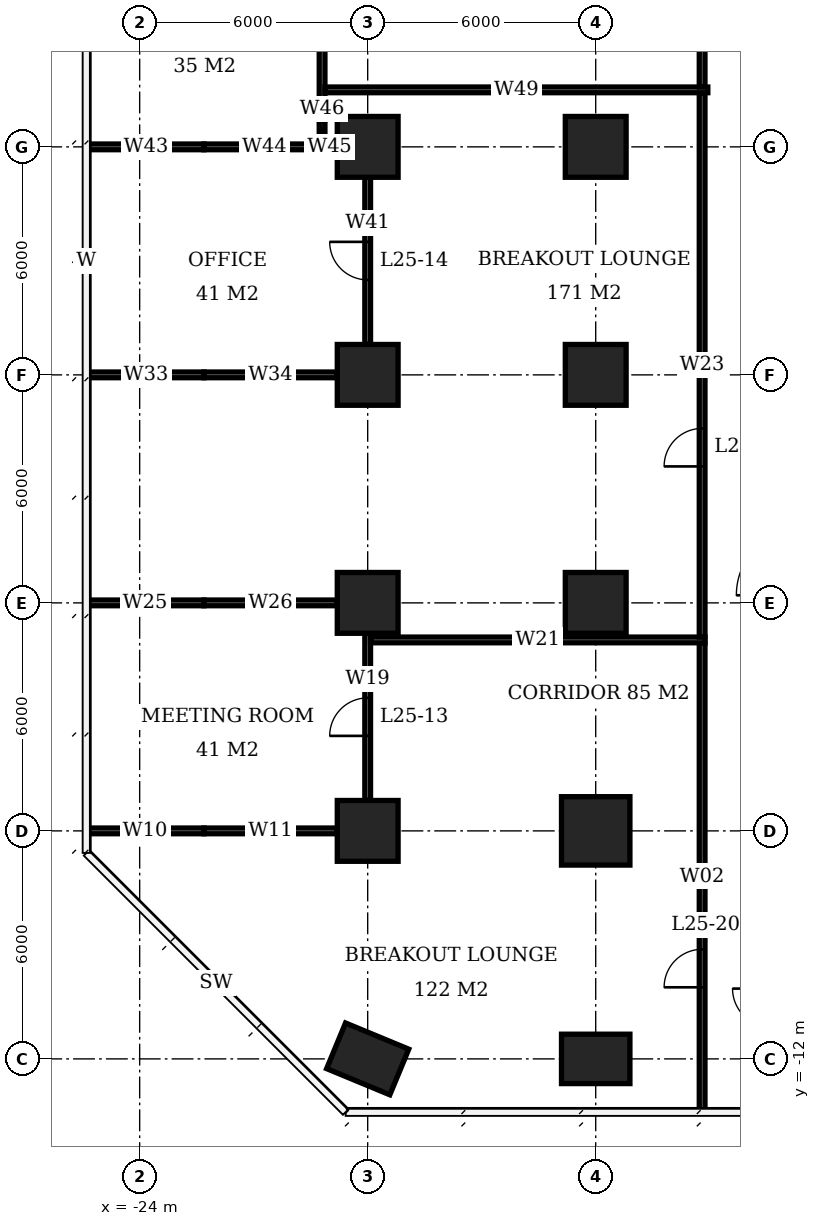
"""IFC4 building model, lengths in metres.
Left out: names, types, materials, properties, quantities, classifications, styles, units other than length and angle.
Written with IfcOpenShell. Run it as: python <this file> out.ifc"""

import sys

from ifc_helpers import new_model, si_unit, direction, frame, frame_2d, origin, origin_2d, place, context, subcontext, project, spatial, rectangle, extrude, element, fill, save


model = new_model("IFC4")
c1 = context("Model", 3, precision=1e-05, world=origin(), true_north=direction((0.0, 1.0)))
c2 = subcontext(c1, "Body", "Model", "MODEL_VIEW")
j1 = project(units=[si_unit("LENGTHUNIT", "METRE"), si_unit("PLANEANGLEUNIT", "RADIAN")], contexts=[c1])
p1 = place(None, origin())
s1 = spatial("IfcSite", under=j1, at=p1, CompositionType="ELEMENT")
p2 = place(p1, origin())
s2 = spatial("IfcBuilding", under=s1, at=p2, CompositionType="ELEMENT")
p3 = place(p2, frame((0.0, 0.0, 105.5)))
s3 = spatial("IfcBuildingStorey", under=s2, at=p3, CompositionType="ELEMENT", Elevation=105.5)
p4 = place(p3, frame((-18.0, -12.0, 0.0), z_axis=(0.0, 0.0, 1.0), x_axis=(-0.923879532511, 0.382683432365, 0.0)))
e1 = element("IfcColumn", 1, at=p4, inside=s3, PredefinedType="COLUMN", context=c2, shape_type="SweptSolid", body=[
    extrude(rectangle(XDim=1.8, YDim=1.3, at=origin_2d()), origin(), (0.0, 0.0, 1.0), 3.9),
])
for number, where, z_axis, x_axis in (
    (2, (-18.0, -6.0, 0.0), (0.0, 0.0, 1.0), (1.0, 0.0, 0.0)),
    (3, (-18.0, 0.0, 0.0), (0.0, 0.0, 1.0), (1.0, 0.0, 0.0)),
    (4, (-18.0, 6.0, 0.0), (0.0, 0.0, 1.0), (1.0, 0.0, 0.0)),
    (5, (-18.0, 12.0, 0.0), (0.0, 0.0, 1.0), (1.0, 0.0, 0.0)),
):
    element("IfcColumn", number, at=place(p3, frame(where, z_axis=z_axis, x_axis=x_axis)), inside=s3, PredefinedType="COLUMN", context=c2, shape_type="SweptSolid", body=[
        extrude(rectangle(XDim=1.6, YDim=1.6, at=origin_2d()), origin(), (0.0, 0.0, 1.0), 3.9),
    ])
p5 = place(p3, frame((-12.0, -12.0, 0.0), z_axis=(0.0, 0.0, 1.0), x_axis=(1.0, 0.0, 0.0)))
e6 = element("IfcColumn", 6, at=p5, inside=s3, PredefinedType="COLUMN", context=c2, shape_type="SweptSolid", body=[
    extrude(rectangle(XDim=1.8, YDim=1.3, at=origin_2d()), origin(), (0.0, 0.0, 1.0), 3.9),
])
p6 = place(p3, frame((-12.0, -6.0, 0.0), z_axis=(0.0, 0.0, 1.0), x_axis=(1.0, 0.0, 0.0)))
e7 = element("IfcColumn", 7, at=p6, inside=s3, PredefinedType="COLUMN", context=c2, shape_type="SweptSolid", body=[
    extrude(rectangle(XDim=1.8, YDim=1.8, at=origin_2d()), origin(), (0.0, 0.0, 1.0), 3.9),
])
for number, where, z_axis, x_axis in (
    (8, (-12.0, 0.0, 0.0), (0.0, 0.0, 1.0), (1.0, 0.0, 0.0)),
    (9, (-12.0, 6.0, 0.0), (0.0, 0.0, 1.0), (1.0, 0.0, 0.0)),
    (10, (-12.0, 12.0, 0.0), (0.0, 0.0, 1.0), (1.0, 0.0, 0.0)),
):
    element("IfcColumn", number, at=place(p3, frame(where, z_axis=z_axis, x_axis=x_axis)), inside=s3, PredefinedType="COLUMN", context=c2, shape_type="SweptSolid", body=[
        extrude(rectangle(XDim=1.6, YDim=1.6, at=origin_2d()), origin(), (0.0, 0.0, 1.0), 3.9),
    ])
p7 = place(p3, frame((-25.4, -6.0, 0.0), z_axis=(0.0, 0.0, 1.0), x_axis=(1.0, 0.0, 0.0)))
e11 = element("IfcWall", 11, at=p7, inside=s3, PredefinedType="PARTITIONING", context=c2, shape_type="SweptSolid", body=[
    extrude(rectangle(XDim=3.09, YDim=0.15, at=frame_2d((1.545, 0.0))), origin(), (0.0, 0.0, 1.0), 3.65),
])
p8 = place(p3, frame((-22.31, -6.0, 0.0), z_axis=(0.0, 0.0, 1.0), x_axis=(1.0, 0.0, 0.0)))
e12 = element("IfcWall", 12, at=p8, inside=s3, PredefinedType="PARTITIONING", context=c2, shape_type="SweptSolid", body=[
    extrude(rectangle(XDim=3.51, YDim=0.15, at=frame_2d((1.755, 0.0))), origin(), (0.0, 0.0, 1.0), 2.65),
])
p9 = place(p3, frame((-25.4, 0.0, 0.0), z_axis=(0.0, 0.0, 1.0), x_axis=(1.0, 0.0, 0.0)))
e13 = element("IfcWall", 13, at=p9, inside=s3, PredefinedType="PARTITIONING", context=c2, shape_type="SweptSolid", body=[
    extrude(rectangle(XDim=3.09, YDim=0.15, at=frame_2d((1.545, 0.0))), origin(), (0.0, 0.0, 1.0), 3.65),
])
p10 = place(p3, frame((-22.31, 0.0, 0.0), z_axis=(0.0, 0.0, 1.0), x_axis=(1.0, 0.0, 0.0)))
e14 = element("IfcWall", 14, at=p10, inside=s3, PredefinedType="PARTITIONING", context=c2, shape_type="SweptSolid", body=[
    extrude(rectangle(XDim=3.51, YDim=0.15, at=frame_2d((1.755, 0.0))), origin(), (0.0, 0.0, 1.0), 2.65),
])
p11 = place(p3, frame((-25.35, 6.0, 0.0), z_axis=(0.0, 0.0, 1.0), x_axis=(1.0, 0.0, 0.0)))
e15 = element("IfcWall", 15, at=p11, inside=s3, PredefinedType="PARTITIONING", context=c2, shape_type="SweptSolid", body=[
    extrude(rectangle(XDim=3.04, YDim=0.15, at=frame_2d((1.52, 0.0))), origin(), (0.0, 0.0, 1.0), 3.65),
])
p12 = place(p3, frame((-22.31, 6.0, 0.0), z_axis=(0.0, 0.0, 1.0), x_axis=(1.0, 0.0, 0.0)))
e16 = element("IfcWall", 16, at=p12, inside=s3, PredefinedType="PARTITIONING", context=c2, shape_type="SweptSolid", body=[
    extrude(rectangle(XDim=3.51, YDim=0.15, at=frame_2d((1.755, 0.0))), origin(), (0.0, 0.0, 1.0), 2.65),
])
p13 = place(p3, frame((-25.35, 12.0, 0.0), z_axis=(0.0, 0.0, 1.0), x_axis=(1.0, 0.0, 0.0)))
e17 = element("IfcWall", 17, at=p13, inside=s3, PredefinedType="PARTITIONING", context=c2, shape_type="SweptSolid", body=[
    extrude(rectangle(XDim=3.04, YDim=0.15, at=frame_2d((1.52, 0.0))), origin(), (0.0, 0.0, 1.0), 3.65),
])
p14 = place(p3, frame((-22.31, 12.0, 0.0), z_axis=(0.0, 0.0, 1.0), x_axis=(1.0, 0.0, 0.0)))
e18 = element("IfcWall", 18, at=p14, inside=s3, PredefinedType="PARTITIONING", context=c2, shape_type="SweptSolid", body=[
    extrude(rectangle(XDim=3.185, YDim=0.15, at=frame_2d((1.593, 0.0))), origin(), (0.0, 0.0, 1.0), 2.65),
])
p15 = place(p3, frame((-19.2, 12.0, 0.0), z_axis=(0.0, 0.0, 1.0), x_axis=(1.0, 0.0, 0.0)))
e19 = element("IfcWall", 19, at=p15, inside=s3, PredefinedType="PARTITIONING", context=c2, shape_type="SweptSolid", body=[
    extrude(rectangle(XDim=0.4, YDim=0.15, at=frame_2d((0.2, 0.0))), origin(), (0.0, 0.0, 1.0), 2.65),
])
p16 = place(p3, frame((-19.2, 12.075, 0.0), z_axis=(0.0, 0.0, 1.0), x_axis=(0.0, 1.0, 0.0)))
e20 = element("IfcWall", 20, at=p16, inside=s3, PredefinedType="PARTITIONING", context=c2, shape_type="SweptSolid", body=[
    extrude(rectangle(XDim=0.635, YDim=0.15, at=frame_2d((0.317, 0.0))), origin(), (0.0, 0.0, 1.0), 2.65),
])
p17 = place(p3, frame((-19.2, 12.71, 0.0), z_axis=(0.0, 0.0, 1.0), x_axis=(0.0, 1.0, 0.0)))
e21 = element("IfcWall", 21, at=p17, inside=s3, PredefinedType="PARTITIONING", context=c2, shape_type="SweptSolid", body=[
    extrude(rectangle(XDim=4.698, YDim=0.15, at=frame_2d((2.349, 0.0))), origin(), (0.0, 0.0, 1.0), 3.65),
])
p18 = place(p17, frame((1.849, 0.0, 0.0)))
e22 = element("IfcOpeningElement", 22, at=p18, cuts=e21, PredefinedType="OPENING", context=c2, shape_type="SweptSolid", body=[
    extrude(rectangle(XDim=1.0, YDim=2.1, at=frame_2d((0.5, 1.05))), frame((0.0, 0.085, 0.0), z_axis=(0.0, -1.0, 0.0), x_axis=(1.0, 0.0, 0.0)), (0.0, 0.0, 1.0), 0.17),
])
p19 = place(p3, frame((-18.0, -5.2, 0.0), z_axis=(0.0, 0.0, 1.0), x_axis=(0.0, 1.0, 0.0)))
e23 = element("IfcWall", 23, at=p19, inside=s3, PredefinedType="PARTITIONING", context=c2, shape_type="SweptSolid", body=[
    extrude(rectangle(XDim=4.4, YDim=0.15, at=frame_2d((2.2, 0.0))), origin(), (0.0, 0.0, 1.0), 3.65),
])
p20 = place(p19, frame((1.7, 0.0, 0.0)))
e24 = element("IfcOpeningElement", 24, at=p20, cuts=e23, PredefinedType="OPENING", context=c2, shape_type="SweptSolid", body=[
    extrude(rectangle(XDim=1.0, YDim=2.1, at=frame_2d((0.5, 1.05))), frame((0.0, 0.085, 0.0), z_axis=(0.0, -1.0, 0.0), x_axis=(1.0, 0.0, 0.0)), (0.0, 0.0, 1.0), 0.17),
])
p21 = place(p3, frame((-18.0, 6.8, 0.0), z_axis=(0.0, 0.0, 1.0), x_axis=(0.0, 1.0, 0.0)))
e25 = element("IfcWall", 25, at=p21, inside=s3, PredefinedType="PARTITIONING", context=c2, shape_type="SweptSolid", body=[
    extrude(rectangle(XDim=4.4, YDim=0.15, at=frame_2d((2.2, 0.0))), origin(), (0.0, 0.0, 1.0), 3.65),
])
p22 = place(p21, frame((1.7, 0.0, 0.0)))
e26 = element("IfcOpeningElement", 26, at=p22, cuts=e25, PredefinedType="OPENING", context=c2, shape_type="SweptSolid", body=[
    extrude(rectangle(XDim=1.0, YDim=2.1, at=frame_2d((0.5, 1.05))), frame((0.0, 0.085, 0.0), z_axis=(0.0, -1.0, 0.0), x_axis=(1.0, 0.0, 0.0)), (0.0, 0.0, 1.0), 0.17),
])
p23 = place(p3, frame((-19.125, 13.5, 0.0), z_axis=(0.0, 0.0, 1.0), x_axis=(1.0, 0.0, 0.0)))
e27 = element("IfcWall", 27, at=p23, inside=s3, PredefinedType="PARTITIONING", context=c2, shape_type="SweptSolid", body=[
    extrude(rectangle(XDim=10.075, YDim=0.15, at=frame_2d((5.038, 0.0))), origin(), (0.0, 0.0, 1.0), 3.65),
])
p24 = place(p3, frame((-17.925, -0.975, 0.0), z_axis=(0.0, 0.0, 1.0), x_axis=(1.0, 0.0, 0.0)))
e28 = element("IfcWall", 28, at=p24, inside=s3, PredefinedType="PARTITIONING", context=c2, shape_type="SweptSolid", body=[
    extrude(rectangle(XDim=8.8, YDim=0.15, at=frame_2d((4.4, 0.0))), origin(), (0.0, 0.0, 1.0), 3.65),
])
p25 = place(p3, frame((-9.2, -13.35, 0.0), z_axis=(0.0, 0.0, 1.0), x_axis=(0.0, 1.0, 0.0)))
e29 = element("IfcWall", 29, at=p25, inside=s3, PredefinedType="PARTITIONING", context=c2, shape_type="SweptSolid", body=[
    extrude(rectangle(XDim=12.3, YDim=0.15, at=frame_2d((6.15, 0.0))), origin(), (0.0, 0.0, 1.0), 3.65),
])
p26 = place(p25, frame((3.234, 0.0, 0.0)))
e30 = element("IfcOpeningElement", 30, at=p26, cuts=e29, PredefinedType="OPENING", context=c2, shape_type="SweptSolid", body=[
    extrude(rectangle(XDim=1.0, YDim=2.1, at=frame_2d((0.5, 1.05))), frame((0.0, 0.085, 0.0), z_axis=(0.0, -1.0, 0.0), x_axis=(1.0, 0.0, 0.0)), (0.0, 0.0, 1.0), 0.17),
])
p27 = place(p3, frame((-9.2, -0.9, 0.0), z_axis=(0.0, 0.0, 1.0), x_axis=(0.0, 1.0, 0.0)))
e31 = element("IfcWall", 31, at=p27, inside=s3, PredefinedType="PARTITIONING", context=c2, shape_type="SweptSolid", body=[
    extrude(rectangle(XDim=14.325, YDim=0.15, at=frame_2d((7.163, 0.0))), origin(), (0.0, 0.0, 1.0), 3.65),
])
p28 = place(p27, frame((4.491, 0.0, 0.0)))
e32 = element("IfcOpeningElement", 32, at=p28, cuts=e31, PredefinedType="OPENING", context=c2, shape_type="SweptSolid", body=[
    extrude(rectangle(XDim=1.0, YDim=2.1, at=frame_2d((0.5, 1.05))), frame((0.0, 0.085, 0.0), z_axis=(0.0, -1.0, 0.0), x_axis=(1.0, 0.0, 0.0)), (0.0, 0.0, 1.0), 0.17),
])
p29 = place(p3, frame((-9.2, 13.575, 0.0), z_axis=(0.0, 0.0, 1.0), x_axis=(0.0, 1.0, 0.0)))
e33 = element("IfcWall", 33, at=p29, inside=s3, PredefinedType="PARTITIONING", context=c2, shape_type="SweptSolid", body=[
    extrude(rectangle(XDim=11.85, YDim=0.15, at=frame_2d((5.925, 0.0))), origin(), (0.0, 0.0, 1.0), 3.65),
])
p30 = place(p29, frame((3.599, 0.0, 0.0)))
e34 = element("IfcOpeningElement", 34, at=p30, cuts=e33, PredefinedType="OPENING", context=c2, shape_type="SweptSolid", body=[
    extrude(rectangle(XDim=1.0, YDim=2.1, at=frame_2d((0.5, 1.05))), frame((0.0, 0.085, 0.0), z_axis=(0.0, -1.0, 0.0), x_axis=(1.0, 0.0, 0.0)), (0.0, 0.0, 1.0), 0.17),
])
p31 = place(p20, origin())
e35 = element("IfcDoor", 35, at=p31, inside=s3, OperationType="SINGLE_SWING_LEFT", PredefinedType="DOOR", context=c2, shape_type="SweptSolid", body=[
    extrude(rectangle(XDim=1.0, YDim=2.1, at=frame_2d((0.5, 1.05))), frame((0.0, 0.025, 0.0), z_axis=(0.0, -1.0, 0.0), x_axis=(1.0, 0.0, 0.0)), (0.0, 0.0, 1.0), 0.05),
])
fill(e24, e35)
p32 = place(p22, origin())
e36 = element("IfcDoor", 36, at=p32, inside=s3, OperationType="SINGLE_SWING_RIGHT", PredefinedType="DOOR", context=c2, shape_type="SweptSolid", body=[
    extrude(rectangle(XDim=1.0, YDim=2.1, at=frame_2d((0.5, 1.05))), frame((0.0, 0.025, 0.0), z_axis=(0.0, -1.0, 0.0), x_axis=(1.0, 0.0, 0.0)), (0.0, 0.0, 1.0), 0.05),
])
fill(e26, e36)
p33 = place(p26, origin())
e37 = element("IfcDoor", 37, at=p33, inside=s3, OperationType="SINGLE_SWING_LEFT", PredefinedType="DOOR", context=c2, shape_type="SweptSolid", body=[
    extrude(rectangle(XDim=1.0, YDim=2.1, at=frame_2d((0.5, 1.05))), frame((0.0, 0.025, 0.0), z_axis=(0.0, -1.0, 0.0), x_axis=(1.0, 0.0, 0.0)), (0.0, 0.0, 1.0), 0.05),
])
fill(e30, e37)
p34 = place(p28, origin())
e38 = element("IfcDoor", 38, at=p34, inside=s3, OperationType="SINGLE_SWING_LEFT", PredefinedType="DOOR", context=c2, shape_type="SweptSolid", body=[
    extrude(rectangle(XDim=1.0, YDim=2.1, at=frame_2d((0.5, 1.05))), frame((0.0, 0.025, 0.0), z_axis=(0.0, -1.0, 0.0), x_axis=(1.0, 0.0, 0.0)), (0.0, 0.0, 1.0), 0.05),
])
fill(e32, e38)
save(model, sys.argv[1])
